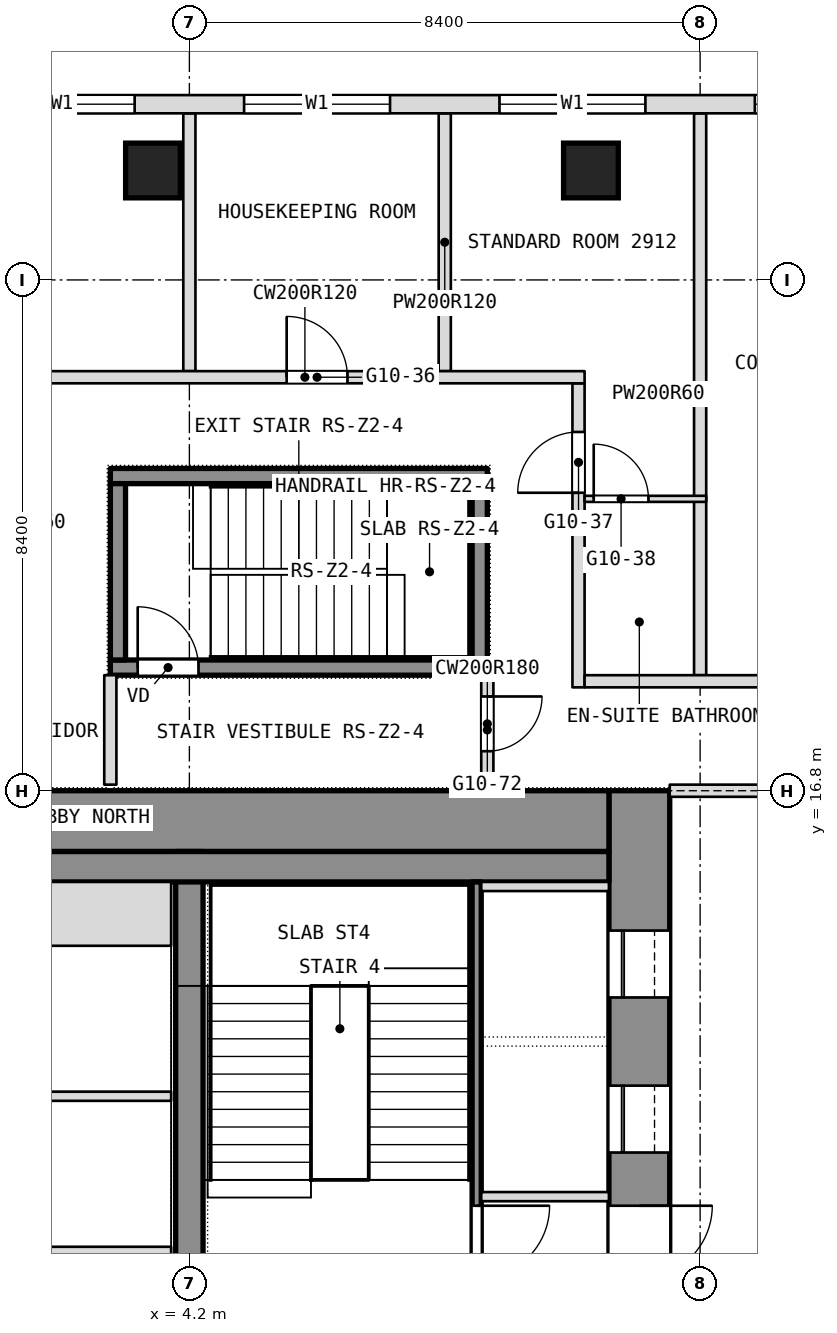
"""IFC4 building model, lengths in metres.
Left out: names, types, materials, properties, quantities, classifications, styles, units other than length and angle.
Written with IfcOpenShell. Run it as: python <this file> out.ifc"""

import sys

from ifc_helpers import new_model, si_unit, direction, frame, frame_2d, origin, origin_2d, place, context, subcontext, project, spatial, rectangle, extrude, element, fill, save


model = new_model("IFC4")
c1 = context("Model", 3, precision=1e-05, world=origin(), true_north=direction((0.0, 1.0)))
c2 = subcontext(c1, "Body", "Model", "MODEL_VIEW")
j1 = project(units=[si_unit("LENGTHUNIT", "METRE"), si_unit("PLANEANGLEUNIT", "RADIAN")], contexts=[c1])
p1 = place(None, origin())
s1 = spatial("IfcSite", under=j1, at=p1, CompositionType="ELEMENT")
p2 = place(p1, origin())
s2 = spatial("IfcBuilding", under=s1, at=p2, CompositionType="ELEMENT")
p3 = place(p2, frame((0.0, 0.0, 130.1)))
s3 = spatial("IfcBuildingStorey", under=s2, at=p3, CompositionType="ELEMENT", Elevation=130.1)
p4 = place(p3, frame((11.6, 0.0, 0.0), z_axis=(0.0, 0.0, 1.0), x_axis=(0.0, 1.0, 0.0)))
e1 = element("IfcWall", 1, at=p4, inside=s3, PredefinedType="SHEAR", context=c2, shape_type="SweptSolid", body=[
    extrude(rectangle(XDim=16.8, YDim=1.0, at=frame_2d((8.4, 0.0))), origin(), (0.0, 0.0, 1.0), 3.6),
])
p5 = place(p4, frame((2.3, 0.0, 0.0)))
e2 = element("IfcOpeningElement", 2, at=p5, cuts=e1, PredefinedType="OPENING", context=c2, shape_type="SweptSolid", body=[
    extrude(rectangle(XDim=1.1, YDim=2.1, at=frame_2d((0.55, 1.05))), frame((0.0, 0.5, 0.0), z_axis=(0.0, -1.0, 0.0), x_axis=(1.0, 0.0, 0.0)), (0.0, 0.0, 1.0), 1.0),
])
p6 = place(p4, frame((4.85, 0.0, 0.0)))
e3 = element("IfcOpeningElement", 3, at=p6, cuts=e1, PredefinedType="OPENING", context=c2, shape_type="SweptSolid", body=[
    extrude(rectangle(XDim=1.1, YDim=2.1, at=frame_2d((0.55, 1.05))), frame((0.0, 0.5, 0.0), z_axis=(0.0, -1.0, 0.0), x_axis=(1.0, 0.0, 0.0)), (0.0, 0.0, 1.0), 1.0),
])
p7 = place(p4, frame((6.825, 0.0, 0.0)))
e4 = element("IfcOpeningElement", 4, at=p7, cuts=e1, PredefinedType="OPENING", context=c2, shape_type="SweptSolid", body=[
    extrude(rectangle(XDim=1.2, YDim=2.1, at=frame_2d((0.6, 1.05))), frame((0.0, 0.5, 0.0), z_axis=(0.0, -1.0, 0.0), x_axis=(1.0, 0.0, 0.0)), (0.0, 0.0, 1.0), 1.0),
])
p8 = place(p4, frame((13.4, 0.0, 0.0)))
e5 = element("IfcOpeningElement", 5, at=p8, cuts=e1, PredefinedType="OPENING", context=c2, shape_type="SweptSolid", body=[
    extrude(rectangle(XDim=1.1, YDim=2.1, at=frame_2d((0.55, 1.05))), frame((0.0, 0.5, 0.0), z_axis=(0.0, -1.0, 0.0), x_axis=(1.0, 0.0, 0.0)), (0.0, 0.0, 1.0), 1.0),
])
p9 = place(p4, frame((10.85, 0.0, 0.0)))
e6 = element("IfcOpeningElement", 6, at=p9, cuts=e1, PredefinedType="OPENING", context=c2, shape_type="SweptSolid", body=[
    extrude(rectangle(XDim=1.1, YDim=2.1, at=frame_2d((0.55, 1.05))), frame((0.0, 0.5, 0.0), z_axis=(0.0, -1.0, 0.0), x_axis=(1.0, 0.0, 0.0)), (0.0, 0.0, 1.0), 1.0),
])
p10 = place(p4, frame((8.775, 0.0, 0.0)))
e7 = element("IfcOpeningElement", 7, at=p10, cuts=e1, PredefinedType="OPENING", context=c2, shape_type="SweptSolid", body=[
    extrude(rectangle(XDim=1.2, YDim=2.1, at=frame_2d((0.6, 1.05))), frame((0.0, 0.5, 0.0), z_axis=(0.0, -1.0, 0.0), x_axis=(1.0, 0.0, 0.0)), (0.0, 0.0, 1.0), 1.0),
])
p11 = place(p3, frame((-11.1, 16.3, 0.0), z_axis=(0.0, 0.0, 1.0), x_axis=(1.0, 0.0, 0.0)))
e8 = element("IfcWall", 8, at=p11, inside=s3, PredefinedType="SHEAR", context=c2, shape_type="SweptSolid", body=[
    extrude(rectangle(XDim=22.2, YDim=1.0, at=frame_2d((11.1, 0.0))), origin(), (0.0, 0.0, 1.0), 3.6),
])
p12 = place(p3, frame((4.2, 1.0, 0.0), z_axis=(0.0, 0.0, 1.0), x_axis=(0.0, 1.0, 0.0)))
e9 = element("IfcWall", 9, at=p12, inside=s3, PredefinedType="SHEAR", context=c2, shape_type="SweptSolid", body=[
    extrude(rectangle(XDim=14.8, YDim=0.45, at=frame_2d((7.4, 0.0))), origin(), (0.0, 0.0, 1.0), 3.6),
])
p13 = place(p12, frame((5.75, 0.0, 0.0)))
e10 = element("IfcOpeningElement", 10, at=p13, cuts=e9, PredefinedType="OPENING", context=c2, shape_type="SweptSolid", body=[
    extrude(rectangle(XDim=1.2, YDim=2.1, at=frame_2d((0.6, 1.05))), frame((0.0, 0.225, 0.0), z_axis=(0.0, -1.0, 0.0), x_axis=(1.0, 0.0, 0.0)), (0.0, 0.0, 1.0), 0.45),
])
for number, where, z_axis, x_axis in (
    (11, (3.601, 27.0, 0.0), (0.0, 0.0, 1.0), (1.0, 0.0, 0.0)),
    (12, (10.804, 27.0, 0.0), (0.0, 0.0, 1.0), (1.0, 0.0, 0.0)),
):
    element("IfcColumn", number, at=place(p3, frame(where, z_axis=z_axis, x_axis=x_axis)), inside=s3, PredefinedType="COLUMN", context=c2, shape_type="SweptSolid", body=[
        extrude(rectangle(XDim=0.9, YDim=0.9, at=origin_2d()), origin(), (0.0, 0.0, 1.0), 3.6),
    ])
p14 = place(p3, frame((12.6, 18.7, 0.0), z_axis=(0.0, 0.0, 1.0), x_axis=(0.0, 1.0, 0.0)))
e13 = element("IfcWall", 13, at=p14, inside=s3, PredefinedType="PARTITIONING", context=c2, shape_type="SweptSolid", body=[
    extrude(rectangle(XDim=9.24, YDim=0.2, at=frame_2d((4.62, 0.0))), origin(), (0.0, 0.0, 1.0), 3.34),
])
p15 = place(p3, frame((10.6, 18.5, 0.0), z_axis=(0.0, 0.0, 1.0), x_axis=(0.0, 1.0, 0.0)))
e14 = element("IfcWall", 14, at=p15, inside=s3, PredefinedType="PARTITIONING", context=c2, shape_type="SweptSolid", body=[
    extrude(rectangle(XDim=5.0, YDim=0.2, at=frame_2d((2.5, 0.0))), origin(), (0.0, 0.0, 1.0), 3.34),
])
p16 = place(p15, frame((3.2, 0.0, 0.0)))
e15 = element("IfcOpeningElement", 15, at=p16, cuts=e14, PredefinedType="OPENING", context=c2, shape_type="SweptSolid", body=[
    extrude(rectangle(XDim=1.0, YDim=2.1, at=frame_2d((0.5, 1.05))), frame((0.0, 0.1, 0.0), z_axis=(0.0, -1.0, 0.0), x_axis=(1.0, 0.0, 0.0)), (0.0, 0.0, 1.0), 0.2),
])
p17 = place(p3, frame((9.1, 16.9, 0.0), z_axis=(0.0, 0.0, 1.0), x_axis=(0.0, 1.0, 0.0)))
e16 = element("IfcWall", 16, at=p17, inside=s3, PredefinedType="PARTITIONING", context=c2, shape_type="SweptSolid", body=[
    extrude(rectangle(XDim=1.8, YDim=0.2, at=frame_2d((0.9, 0.0))), origin(), (0.0, 0.0, 1.0), 3.34),
])
p18 = place(p17, frame((0.55, 0.0, 0.0)))
e17 = element("IfcOpeningElement", 17, at=p18, cuts=e16, PredefinedType="OPENING", context=c2, shape_type="SweptSolid", body=[
    extrude(rectangle(XDim=0.9, YDim=2.1, at=frame_2d((0.45, 1.05))), frame((0.0, 0.1, 0.0), z_axis=(0.0, -1.0, 0.0), x_axis=(1.0, 0.0, 0.0)), (0.0, 0.0, 1.0), 0.2),
])
for number, where, z_axis, x_axis in (
    (18, (8.4, 23.7, 0.0), (0.0, 0.0, 1.0), (0.0, 1.0, 0.0)),
    (19, (4.2, 23.7, 0.0), (0.0, 0.0, 1.0), (0.0, 1.0, 0.0)),
):
    element("IfcWall", number, at=place(p3, frame(where, z_axis=z_axis, x_axis=x_axis)), inside=s3, PredefinedType="PARTITIONING", context=c2, shape_type="SweptSolid", body=[
        extrude(rectangle(XDim=4.24, YDim=0.2, at=frame_2d((2.12, 0.0))), origin(), (0.0, 0.0, 1.0), 3.34),
    ])
p19 = place(p3, frame((2.9, 16.9, 0.0), z_axis=(0.0, 0.0, 1.0), x_axis=(0.0, 1.0, 0.0)))
e20 = element("IfcWall", 20, at=p19, inside=s3, PredefinedType="PARTITIONING", context=c2, shape_type="SweptSolid", body=[
    extrude(rectangle(XDim=1.8, YDim=0.2, at=frame_2d((0.9, 0.0))), origin(), (0.0, 0.0, 1.0), 3.34),
])
p20 = place(p3, frame((10.7, 18.6, 0.0), z_axis=(0.0, 0.0, 1.0), x_axis=(1.0, 0.0, 0.0)))
e21 = element("IfcWall", 21, at=p20, inside=s3, PredefinedType="PARTITIONING", context=c2, shape_type="SweptSolid", body=[
    extrude(rectangle(XDim=6.2, YDim=0.2, at=frame_2d((3.1, 0.0))), origin(), (0.0, 0.0, 1.0), 3.34),
])
p21 = place(p20, frame((3.5, 0.0, 0.0)))
e22 = element("IfcOpeningElement", 22, at=p21, cuts=e21, PredefinedType="OPENING", context=c2, shape_type="SweptSolid", body=[
    extrude(rectangle(XDim=1.0, YDim=2.1, at=frame_2d((0.5, 1.05))), frame((0.0, 0.1, 0.0), z_axis=(0.0, -1.0, 0.0), x_axis=(1.0, 0.0, 0.0)), (0.0, 0.0, 1.0), 0.2),
])
p22 = place(p3, frame((10.7, 21.6, 0.0), z_axis=(0.0, 0.0, 1.0), x_axis=(1.0, 0.0, 0.0)))
e23 = element("IfcWall", 23, at=p22, inside=s3, PredefinedType="PARTITIONING", context=c2, shape_type="SweptSolid", body=[
    extrude(rectangle(XDim=2.0, YDim=0.1, at=frame_2d((1.0, 0.0))), origin(), (0.0, 0.0, 1.0), 3.34),
])
p23 = place(p22, frame((0.15, 0.0, 0.0)))
e24 = element("IfcOpeningElement", 24, at=p23, cuts=e23, PredefinedType="OPENING", context=c2, shape_type="SweptSolid", body=[
    extrude(rectangle(XDim=0.9, YDim=2.1, at=frame_2d((0.45, 1.05))), frame((0.0, 0.05, 0.0), z_axis=(0.0, -1.0, 0.0), x_axis=(1.0, 0.0, 0.0)), (0.0, 0.0, 1.0), 0.1),
])
p24 = place(p3, frame((1.5, 23.6, 0.0), z_axis=(0.0, 0.0, 1.0), x_axis=(1.0, 0.0, 0.0)))
e25 = element("IfcWall", 25, at=p24, inside=s3, PredefinedType="PARTITIONING", context=c2, shape_type="SweptSolid", body=[
    extrude(rectangle(XDim=9.2, YDim=0.2, at=frame_2d((4.6, 0.0))), origin(), (0.0, 0.0, 1.0), 3.34),
])
p25 = place(p24, frame((4.3, 0.0, 0.0)))
e26 = element("IfcOpeningElement", 26, at=p25, cuts=e25, PredefinedType="OPENING", context=c2, shape_type="SweptSolid", body=[
    extrude(rectangle(XDim=1.0, YDim=2.1, at=frame_2d((0.5, 1.05))), frame((0.0, 0.1, 0.0), z_axis=(0.0, -1.0, 0.0), x_axis=(1.0, 0.0, 0.0)), (0.0, 0.0, 1.0), 0.2),
])
p26 = place(p3, frame((21.306, 28.09, 0.0), z_axis=(0.0, 0.0, 1.0), x_axis=(-1.0, 0.0, 0.0)))
e27 = element("IfcWall", 27, at=p26, inside=s3, PredefinedType="NOTDEFINED", context=c2, shape_type="SweptSolid", body=[
    extrude(rectangle(XDim=42.612, YDim=0.3, at=frame_2d((21.306, 0.0))), origin(), (0.0, 0.0, 1.0), 3.6),
])
p27 = place(p26, frame((5.406, 0.0, 0.9)))
e28 = element("IfcOpeningElement", 28, at=p27, cuts=e27, PredefinedType="OPENING", context=c2, shape_type="SweptSolid", body=[
    extrude(rectangle(XDim=2.4, YDim=2.1, at=frame_2d((1.2, 1.05))), frame((0.0, 0.15, 0.0), z_axis=(0.0, -1.0, 0.0), x_axis=(1.0, 0.0, 0.0)), (0.0, 0.0, 1.0), 0.3),
])
p28 = place(p26, frame((9.606, 0.0, 0.9)))
e29 = element("IfcOpeningElement", 29, at=p28, cuts=e27, PredefinedType="OPENING", context=c2, shape_type="SweptSolid", body=[
    extrude(rectangle(XDim=2.4, YDim=2.1, at=frame_2d((1.2, 1.05))), frame((0.0, 0.15, 0.0), z_axis=(0.0, -1.0, 0.0), x_axis=(1.0, 0.0, 0.0)), (0.0, 0.0, 1.0), 0.3),
])
p29 = place(p26, frame((13.806, 0.0, 0.9)))
e30 = element("IfcOpeningElement", 30, at=p29, cuts=e27, PredefinedType="OPENING", context=c2, shape_type="SweptSolid", body=[
    extrude(rectangle(XDim=2.4, YDim=2.1, at=frame_2d((1.2, 1.05))), frame((0.0, 0.15, 0.0), z_axis=(0.0, -1.0, 0.0), x_axis=(1.0, 0.0, 0.0)), (0.0, 0.0, 1.0), 0.3),
])
p30 = place(p26, frame((18.006, 0.0, 0.9)))
e31 = element("IfcOpeningElement", 31, at=p30, cuts=e27, PredefinedType="OPENING", context=c2, shape_type="SweptSolid", body=[
    extrude(rectangle(XDim=2.4, YDim=2.1, at=frame_2d((1.2, 1.05))), frame((0.0, 0.15, 0.0), z_axis=(0.0, -1.0, 0.0), x_axis=(1.0, 0.0, 0.0)), (0.0, 0.0, 1.0), 0.3),
])
p31 = place(p26, frame((22.206, 0.0, 0.9)))
e32 = element("IfcOpeningElement", 32, at=p31, cuts=e27, PredefinedType="OPENING", context=c2, shape_type="SweptSolid", body=[
    extrude(rectangle(XDim=2.4, YDim=2.1, at=frame_2d((1.2, 1.05))), frame((0.0, 0.15, 0.0), z_axis=(0.0, -1.0, 0.0), x_axis=(1.0, 0.0, 0.0)), (0.0, 0.0, 1.0), 0.3),
])
p32 = place(p26, frame((26.406, 0.0, 0.9)))
e33 = element("IfcOpeningElement", 33, at=p32, cuts=e27, PredefinedType="OPENING", context=c2, shape_type="SweptSolid", body=[
    extrude(rectangle(XDim=2.4, YDim=2.1, at=frame_2d((1.2, 1.05))), frame((0.0, 0.15, 0.0), z_axis=(0.0, -1.0, 0.0), x_axis=(1.0, 0.0, 0.0)), (0.0, 0.0, 1.0), 0.3),
])
p33 = place(p26, frame((30.606, 0.0, 0.9)))
e34 = element("IfcOpeningElement", 34, at=p33, cuts=e27, PredefinedType="OPENING", context=c2, shape_type="SweptSolid", body=[
    extrude(rectangle(XDim=2.4, YDim=2.1, at=frame_2d((1.2, 1.05))), frame((0.0, 0.15, 0.0), z_axis=(0.0, -1.0, 0.0), x_axis=(1.0, 0.0, 0.0)), (0.0, 0.0, 1.0), 0.3),
])
p34 = place(p26, frame((34.806, 0.0, 0.9)))
e35 = element("IfcOpeningElement", 35, at=p34, cuts=e27, PredefinedType="OPENING", context=c2, shape_type="SweptSolid", body=[
    extrude(rectangle(XDim=2.4, YDim=2.1, at=frame_2d((1.2, 1.05))), frame((0.0, 0.15, 0.0), z_axis=(0.0, -1.0, 0.0), x_axis=(1.0, 0.0, 0.0)), (0.0, 0.0, 1.0), 0.3),
])
p35 = place(p3, frame((-11.1, 15.55, 0.0), z_axis=(0.0, 0.0, 1.0), x_axis=(1.0, 0.0, 0.0)))
e36 = element("IfcWall", 36, at=p35, inside=s3, PredefinedType="PARTITIONING", context=c2, shape_type="SweptSolid", body=[
    extrude(rectangle(XDim=22.2, YDim=0.5, at=frame_2d((11.1, 0.0))), origin(), (0.0, 0.0, 1.0), 3.34),
])
p36 = place(p3, frame((8.925, 8.7, 0.0), z_axis=(0.0, 0.0, 1.0), x_axis=(0.0, 1.0, 0.0)))
e37 = element("IfcWall", 37, at=p36, inside=s3, PredefinedType="SHEAR", context=c2, shape_type="SweptSolid", body=[
    extrude(rectangle(XDim=6.6, YDim=0.15, at=frame_2d((3.3, 0.0))), origin(), (0.0, 0.0, 1.0), 3.34),
])
p37 = place(p36, frame((0.075, 0.0, 0.0)))
e38 = element("IfcOpeningElement", 38, at=p37, cuts=e37, PredefinedType="OPENING", context=c2, shape_type="SweptSolid", body=[
    extrude(rectangle(XDim=1.2, YDim=2.1, at=frame_2d((0.6, 1.05))), frame((0.0, 0.075, 0.0), z_axis=(0.0, -1.0, 0.0), x_axis=(1.0, 0.0, 0.0)), (0.0, 0.0, 1.0), 0.15),
])
for number, where, z_axis, x_axis in (
    (39, (9.0, 10.125, 0.0), (0.0, 0.0, 1.0), (1.0, 0.0, 0.0)),
    (40, (9.0, 15.225, 0.0), (0.0, 0.0, 1.0), (1.0, 0.0, 0.0)),
):
    element("IfcWall", number, at=place(p3, frame(where, z_axis=z_axis, x_axis=x_axis)), inside=s3, PredefinedType="SHEAR", context=c2, shape_type="SweptSolid", body=[
        extrude(rectangle(XDim=2.1, YDim=0.15, at=frame_2d((1.05, 0.0))), origin(), (0.0, 0.0, 1.0), 3.6),
    ])
p38 = place(p3, frame((-3.9, 11.775, 0.0), z_axis=(0.0, 0.0, 1.0), x_axis=(1.0, 0.0, 0.0)))
e41 = element("IfcWall", 41, at=p38, inside=s3, PredefinedType="PARTITIONING", context=c2, shape_type="SweptSolid", body=[
    extrude(rectangle(XDim=7.8, YDim=0.15, at=frame_2d((3.9, 0.0))), origin(), (0.0, 0.0, 1.0), 3.34),
])
p39 = place(p38, frame((3.3, 0.0, 0.0)))
e42 = element("IfcOpeningElement", 42, at=p39, cuts=e41, PredefinedType="OPENING", context=c2, shape_type="SweptSolid", body=[
    extrude(rectangle(XDim=1.2, YDim=2.1, at=frame_2d((0.6, 1.05))), frame((0.0, 0.075, 0.0), z_axis=(0.0, -1.0, 0.0), x_axis=(1.0, 0.0, 0.0)), (0.0, 0.0, 1.0), 0.15),
])
p40 = place(p3, frame((1.65, 14.775, 0.0), z_axis=(0.0, 0.0, 1.0), x_axis=(1.0, 0.0, 0.0)))
e43 = element("IfcWall", 43, at=p40, inside=s3, PredefinedType="SHEAR", context=c2, shape_type="SweptSolid", body=[
    extrude(rectangle(XDim=2.25, YDim=1.05, at=frame_2d((1.125, 0.0))), origin(), (0.0, 0.0, 1.0), 3.6),
])
p41 = place(p3, frame((1.65, 9.225, 0.0), z_axis=(0.0, 0.0, 1.0), x_axis=(1.0, 0.0, 0.0)))
e44 = element("IfcWall", 44, at=p41, inside=s3, PredefinedType="SHEAR", context=c2, shape_type="SweptSolid", body=[
    extrude(rectangle(XDim=2.25, YDim=0.15, at=frame_2d((1.125, 0.0))), origin(), (0.0, 0.0, 1.0), 3.6),
])
p42 = place(p3, frame((12.1, 16.8, 0.0), z_axis=(0.0, 0.0, 1.0), x_axis=(1.0, 0.0, 0.0)))
e45 = element("IfcWall", 45, at=p42, inside=s3, PredefinedType="PARTITIONING", context=c2, shape_type="SweptSolid", body=[
    extrude(rectangle(XDim=4.6, YDim=0.2, at=frame_2d((2.3, 0.0))), origin(), (0.0, 0.0, 1.0), 2.89),
])
p43 = place(p3, frame((2.9, 18.825, 0.1), z_axis=(0.0, 0.0, 1.0), x_axis=(1.0, 0.0, 0.0)))
e46 = element("IfcWall", 46, at=p43, inside=s3, PredefinedType="SHEAR", context=c2, shape_type="SweptSolid", body=[
    extrude(rectangle(XDim=6.2, YDim=0.25, at=frame_2d((3.1, 0.0))), origin(), (0.0, 0.0, 1.0), 3.6),
])
p44 = place(p43, frame((0.45, 0.0, 0.0)))
e47 = element("IfcOpeningElement", 47, at=p44, cuts=e46, PredefinedType="OPENING", context=c2, shape_type="SweptSolid", body=[
    extrude(rectangle(XDim=1.0, YDim=2.1, at=frame_2d((0.5, 1.05))), frame((0.0, 0.125, 0.0), z_axis=(0.0, -1.0, 0.0), x_axis=(1.0, 0.0, 0.0)), (0.0, 0.0, 1.0), 0.25),
])
p45 = place(p3, frame((2.9, 21.975, 0.1), z_axis=(0.0, 0.0, 1.0), x_axis=(1.0, 0.0, 0.0)))
e48 = element("IfcWall", 48, at=p45, inside=s3, PredefinedType="SHEAR", context=c2, shape_type="SweptSolid", body=[
    extrude(rectangle(XDim=6.2, YDim=0.25, at=frame_2d((3.1, 0.0))), origin(), (0.0, 0.0, 1.0), 3.6),
])
for number, where, z_axis, x_axis in (
    (49, (3.025, 18.95, 0.1), (0.0, 0.0, 1.0), (0.0, 1.0, 0.0)),
    (50, (8.975, 18.95, 0.1), (0.0, 0.0, 1.0), (0.0, 1.0, 0.0)),
):
    element("IfcWall", number, at=place(p3, frame(where, z_axis=z_axis, x_axis=x_axis)), inside=s3, PredefinedType="SHEAR", context=c2, shape_type="SweptSolid", body=[
        extrude(rectangle(XDim=2.9, YDim=0.25, at=frame_2d((1.45, 0.0))), origin(), (0.0, 0.0, 1.0), 3.6),
    ])
p46 = place(p16, origin())
e51 = element("IfcDoor", 51, at=p46, inside=s3, OperationType="SINGLE_SWING_LEFT", PredefinedType="DOOR", context=c2, shape_type="SweptSolid", body=[
    extrude(rectangle(XDim=1.0, YDim=2.1, at=frame_2d((0.5, 1.05))), frame((0.0, 0.025, 0.0), z_axis=(0.0, -1.0, 0.0), x_axis=(1.0, 0.0, 0.0)), (0.0, 0.0, 1.0), 0.05),
])
fill(e15, e51)
p47 = place(p18, origin())
e52 = element("IfcDoor", 52, at=p47, inside=s3, OperationType="SINGLE_SWING_RIGHT", PredefinedType="DOOR", context=c2, shape_type="SweptSolid", body=[
    extrude(rectangle(XDim=0.9, YDim=2.1, at=frame_2d((0.45, 1.05))), frame((0.0, 0.025, 0.0), z_axis=(0.0, -1.0, 0.0), x_axis=(1.0, 0.0, 0.0)), (0.0, 0.0, 1.0), 0.05),
])
fill(e17, e52)
p48 = place(p23, origin())
e53 = element("IfcDoor", 53, at=p48, inside=s3, OperationType="SINGLE_SWING_RIGHT", PredefinedType="DOOR", context=c2, shape_type="SweptSolid", body=[
    extrude(rectangle(XDim=0.9, YDim=2.1, at=frame_2d((0.45, 1.05))), frame((0.0, 0.025, 0.0), z_axis=(0.0, -1.0, 0.0), x_axis=(1.0, 0.0, 0.0)), (0.0, 0.0, 1.0), 0.05),
])
fill(e24, e53)
p49 = place(p25, origin())
e54 = element("IfcDoor", 54, at=p49, inside=s3, OperationType="SINGLE_SWING_LEFT", PredefinedType="DOOR", context=c2, shape_type="SweptSolid", body=[
    extrude(rectangle(XDim=1.0, YDim=2.1, at=frame_2d((0.5, 1.05))), frame((0.0, 0.025, 0.0), z_axis=(0.0, -1.0, 0.0), x_axis=(1.0, 0.0, 0.0)), (0.0, 0.0, 1.0), 0.05),
])
fill(e26, e54)
p50 = place(p27, origin())
e55 = element("IfcWindow", 55, at=p50, inside=s3, PartitioningType="SINGLE_PANEL", PredefinedType="WINDOW", context=c2, shape_type="SweptSolid", body=[
    extrude(rectangle(XDim=2.4, YDim=2.1, at=frame_2d((1.2, 1.05))), frame((0.0, 0.03, 0.0), z_axis=(0.0, -1.0, 0.0), x_axis=(1.0, 0.0, 0.0)), (0.0, 0.0, 1.0), 0.06),
])
fill(e28, e55)
p51 = place(p28, origin())
e56 = element("IfcWindow", 56, at=p51, inside=s3, PartitioningType="SINGLE_PANEL", PredefinedType="WINDOW", context=c2, shape_type="SweptSolid", body=[
    extrude(rectangle(XDim=2.4, YDim=2.1, at=frame_2d((1.2, 1.05))), frame((0.0, 0.03, 0.0), z_axis=(0.0, -1.0, 0.0), x_axis=(1.0, 0.0, 0.0)), (0.0, 0.0, 1.0), 0.06),
])
fill(e29, e56)
p52 = place(p29, origin())
e57 = element("IfcWindow", 57, at=p52, inside=s3, PartitioningType="SINGLE_PANEL", PredefinedType="WINDOW", context=c2, shape_type="SweptSolid", body=[
    extrude(rectangle(XDim=2.4, YDim=2.1, at=frame_2d((1.2, 1.05))), frame((0.0, 0.03, 0.0), z_axis=(0.0, -1.0, 0.0), x_axis=(1.0, 0.0, 0.0)), (0.0, 0.0, 1.0), 0.06),
])
fill(e30, e57)
p53 = place(p30, origin())
e58 = element("IfcWindow", 58, at=p53, inside=s3, PartitioningType="SINGLE_PANEL", PredefinedType="WINDOW", context=c2, shape_type="SweptSolid", body=[
    extrude(rectangle(XDim=2.4, YDim=2.1, at=frame_2d((1.2, 1.05))), frame((0.0, 0.03, 0.0), z_axis=(0.0, -1.0, 0.0), x_axis=(1.0, 0.0, 0.0)), (0.0, 0.0, 1.0), 0.06),
])
fill(e31, e58)
p54 = place(p44, origin())
e59 = element("IfcDoor", 59, at=p54, inside=s3, OperationType="SINGLE_SWING_LEFT", PredefinedType="DOOR", context=c2, shape_type="SweptSolid", body=[
    extrude(rectangle(XDim=1.0, YDim=2.1, at=frame_2d((0.5, 1.05))), frame((0.0, 0.025, 0.0), z_axis=(0.0, -1.0, 0.0), x_axis=(1.0, 0.0, 0.0)), (0.0, 0.0, 1.0), 0.05),
])
fill(e47, e59)
p55 = place(p8, origin())
e60 = element("IfcDoor", 60, at=p55, inside=s3, OperationType="SLIDING_TO_LEFT", PredefinedType="DOOR", context=c2, shape_type="SweptSolid", body=[
    extrude(rectangle(XDim=1.1, YDim=2.1, at=frame_2d((0.55, 1.05))), frame((0.0, 0.025, 0.0), z_axis=(0.0, -1.0, 0.0), x_axis=(1.0, 0.0, 0.0)), (0.0, 0.0, 1.0), 0.05),
])
fill(e5, e60)
p56 = place(p9, origin())
e61 = element("IfcDoor", 61, at=p56, inside=s3, OperationType="SLIDING_TO_LEFT", PredefinedType="DOOR", context=c2, shape_type="SweptSolid", body=[
    extrude(rectangle(XDim=1.1, YDim=2.1, at=frame_2d((0.55, 1.05))), frame((0.0, 0.025, 0.0), z_axis=(0.0, -1.0, 0.0), x_axis=(1.0, 0.0, 0.0)), (0.0, 0.0, 1.0), 0.05),
])
fill(e6, e61)
p57 = place(p10, origin())
e62 = element("IfcDoor", 62, at=p57, inside=s3, OperationType="SINGLE_SWING_LEFT", PredefinedType="DOOR", context=c2, shape_type="SweptSolid", body=[
    extrude(rectangle(XDim=1.2, YDim=2.1, at=frame_2d((0.6, 1.05))), frame((0.0, 0.025, 0.0), z_axis=(0.0, -1.0, 0.0), x_axis=(1.0, 0.0, 0.0)), (0.0, 0.0, 1.0), 0.05),
])
fill(e7, e62)
p58 = place(p37, origin())
e63 = element("IfcDoor", 63, at=p58, inside=s3, OperationType="SINGLE_SWING_LEFT", PredefinedType="DOOR", context=c2, shape_type="SweptSolid", body=[
    extrude(rectangle(XDim=1.2, YDim=2.1, at=frame_2d((0.6, 1.05))), frame((0.0, 0.025, 0.0), z_axis=(0.0, -1.0, 0.0), x_axis=(1.0, 0.0, 0.0)), (0.0, 0.0, 1.0), 0.05),
])
fill(e38, e63)
save(model, sys.argv[1])
